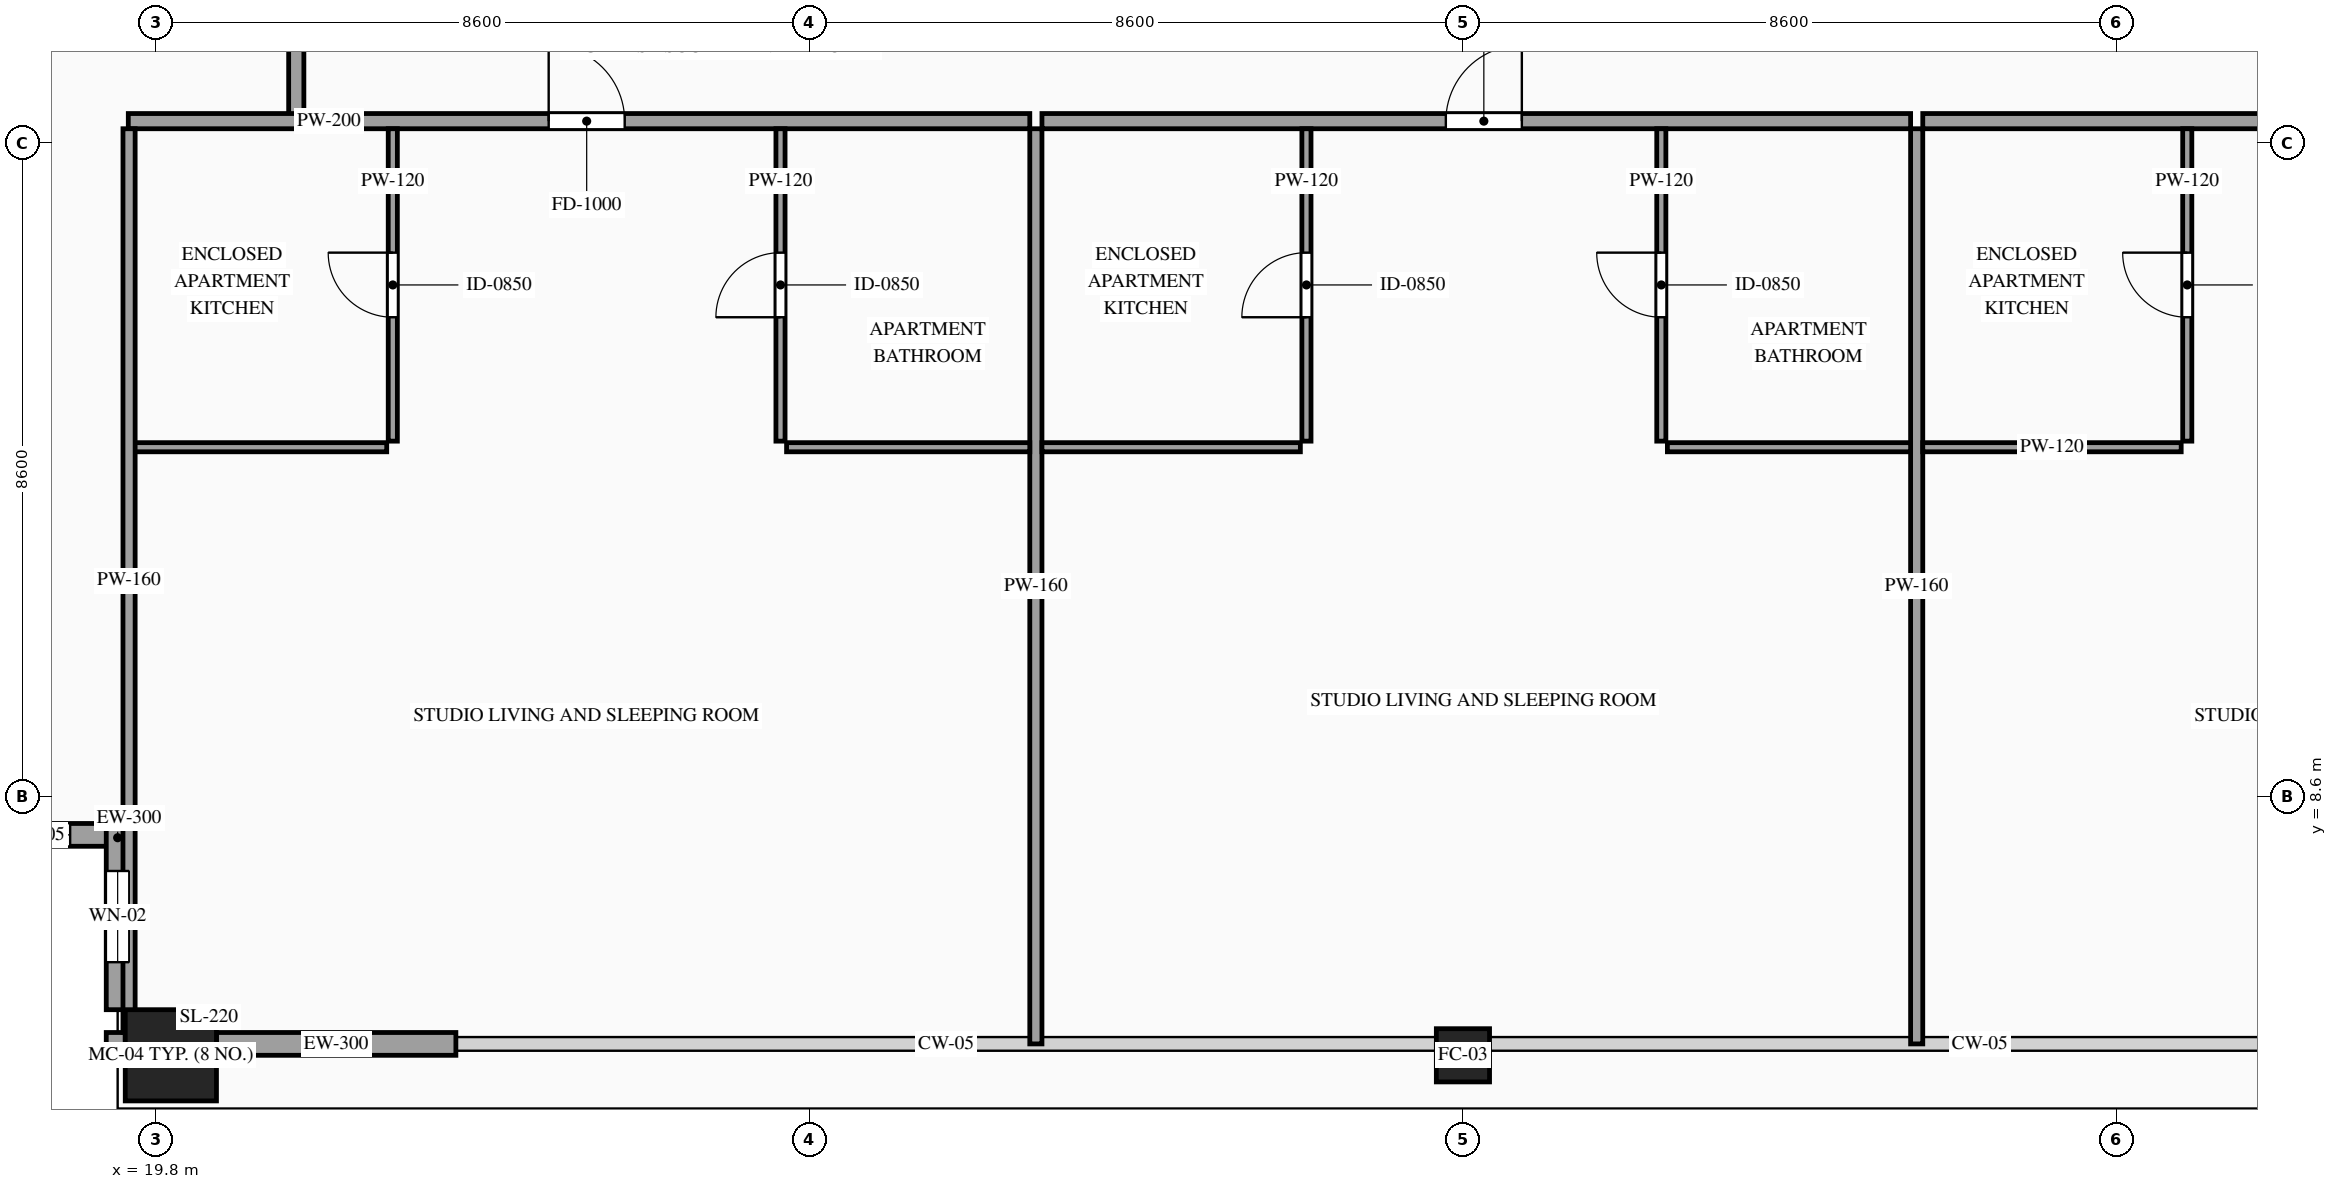
"""IFC4 building model, lengths in metres.
Left out: names, types, materials, properties, quantities, classifications, styles, units other than length and angle.
Written with IfcOpenShell. Run it as: python <this file> out.ifc"""

import sys

from ifc_helpers import new_model, si_unit, direction, frame, frame_2d, origin, origin_2d, place, context, subcontext, project, spatial, rectangle, hollow_rectangle, extrude, source, transform, mapped, element, fill, save


model = new_model("IFC4")
c1 = context("Model", 3, precision=1e-05, world=origin(), true_north=direction((0.0, 1.0)))
c2 = subcontext(c1, "Body", "Model", "MODEL_VIEW")
j1 = project(units=[si_unit("LENGTHUNIT", "METRE"), si_unit("PLANEANGLEUNIT", "RADIAN")], contexts=[c1])
p1 = place(None, origin())
s1 = spatial("IfcSite", under=j1, at=p1, CompositionType="ELEMENT")
p2 = place(p1, origin())
s2 = spatial("IfcBuilding", under=s1, at=p2, CompositionType="ELEMENT")
p3 = place(p2, frame((0.0, 0.0, 268.1)))
s3 = spatial("IfcBuildingStorey", under=s2, at=p3, CompositionType="ELEMENT", Elevation=268.1)
m1 = source(origin(), c2, "Body", "SweptSolid", [
    extrude(hollow_rectangle(XDim=1.2, YDim=1.2, WallThickness=0.055, at=origin_2d()), origin(), (0.0, 0.0, 1.0), 3.5),
])
p4 = place(p3, frame((20.0, 5.2, 0.0), z_axis=(0.0, 0.0, 1.0), x_axis=(1.0, 0.0, 0.0)))
e1 = element("IfcColumn", 1, at=p4, inside=s3, PredefinedType="COLUMN", context=c2, shape_type="MappedRepresentation", body=[
    mapped(m1, transform((0.0, 0.0, 0.0), scale=1.0)),
])
m2 = source(origin(), c2, "Body", "SweptSolid", [
    extrude(hollow_rectangle(XDim=0.7, YDim=0.7, WallThickness=0.032, at=origin_2d()), origin(), (0.0, 0.0, 1.0), 3.5),
])
p5 = place(p3, frame((37.0, 5.2, 0.0), z_axis=(0.0, 0.0, 1.0), x_axis=(1.0, 0.0, 0.0)))
e2 = element("IfcColumn", 2, at=p5, inside=s3, PredefinedType="COLUMN", context=c2, shape_type="MappedRepresentation", body=[
    mapped(m2, transform((0.0, 0.0, 0.0), scale=1.0)),
])
p6 = place(p3, frame((17.0, 8.1, 0.0), z_axis=(0.0, 0.0, 1.0), x_axis=(1.0, 0.0, 0.0)))
e3 = element("IfcWall", 3, at=p6, inside=s3, PredefinedType="SOLIDWALL", context=c2, shape_type="SweptSolid", body=[
    extrude(rectangle(XDim=2.45, YDim=0.3, at=frame_2d((1.225, 0.0))), origin(), (0.0, 0.0, 1.0), 3.28),
])
p7 = place(p6, frame((0.775, 0.0, 0.85)))
e4 = element("IfcOpeningElement", 4, at=p7, cuts=e3, PredefinedType="OPENING", context=c2, shape_type="SweptSolid", body=[
    extrude(rectangle(XDim=0.9, YDim=1.5, at=frame_2d((0.45, 0.75))), frame((0.0, 0.165, 0.0), z_axis=(0.0, -1.0, 0.0), x_axis=(1.0, 0.0, 0.0)), (0.0, 0.0, 1.0), 0.33),
])
p8 = place(p3, frame((19.3, 8.25, 0.0), z_axis=(0.0, 0.0, 1.0), x_axis=(0.0, -1.0, 0.0)))
e5 = element("IfcWall", 5, at=p8, inside=s3, PredefinedType="SOLIDWALL", context=c2, shape_type="SweptSolid", body=[
    extrude(rectangle(XDim=2.45, YDim=0.3, at=frame_2d((1.225, 0.0))), origin(), (0.0, 0.0, 1.0), 3.28),
])
p9 = place(p8, frame((0.625, 0.0, 0.85)))
e6 = element("IfcOpeningElement", 6, at=p9, cuts=e5, PredefinedType="OPENING", context=c2, shape_type="SweptSolid", body=[
    extrude(rectangle(XDim=1.2, YDim=2.1, at=frame_2d((0.6, 1.05))), frame((0.0, 0.165, 0.0), z_axis=(0.0, -1.0, 0.0), x_axis=(1.0, 0.0, 0.0)), (0.0, 0.0, 1.0), 0.33),
])
m3 = source(origin(), c2, "Body", "SweptSolid", [
    extrude(rectangle(XDim=0.25, YDim=0.3, at=frame_2d((0.125, 0.0))), origin(), (0.0, 0.0, 1.0), 3.28),
])
p10 = place(p3, frame((19.15, 5.35, 0.0), z_axis=(0.0, 0.0, 1.0), x_axis=(1.0, 0.0, 0.0)))
e7 = element("IfcWall", 7, at=p10, inside=s3, PredefinedType="SOLIDWALL", context=c2, shape_type="MappedRepresentation", body=[
    mapped(m3, transform((0.0, 0.0, 0.0), scale=1.0)),
])
m4 = source(origin(), c2, "Body", "SweptSolid", [
    extrude(rectangle(XDim=3.15, YDim=0.3, at=frame_2d((1.575, 0.0))), origin(), (0.0, 0.0, 1.0), 2.835),
])
p11 = place(p3, frame((20.6, 5.35, 0.0), z_axis=(0.0, 0.0, 1.0), x_axis=(1.0, 0.0, 0.0)))
e8 = element("IfcWall", 8, at=p11, inside=s3, PredefinedType="SOLIDWALL", context=c2, shape_type="MappedRepresentation", body=[
    mapped(m4, transform((0.0, 0.0, 0.0), scale=1.0)),
])
m5 = source(origin(), c2, "Body", "SweptSolid", [
    extrude(rectangle(XDim=1.7, YDim=0.2, at=frame_2d((0.85, 0.0))), origin(), (0.0, 0.0, 1.0), 3.28),
])
p12 = place(p3, frame((21.65, 17.55, 0.0), z_axis=(0.0, 0.0, 1.0), x_axis=(0.0, 1.0, 0.0)))
e9 = element("IfcWall", 9, at=p12, inside=s3, PredefinedType="PARTITIONING", context=c2, shape_type="MappedRepresentation", body=[
    mapped(m5, transform((0.0, 0.0, 0.0), scale=1.0)),
])
p13 = place(p3, frame((19.44, 17.49, 0.0), z_axis=(0.0, 0.0, 1.0), x_axis=(1.0, 0.0, 0.0)))
e10 = element("IfcWall", 10, at=p13, inside=s3, PredefinedType="PARTITIONING", context=c2, shape_type="SweptSolid", body=[
    extrude(rectangle(XDim=11.861, YDim=0.2, at=frame_2d((5.931, 0.0))), origin(), (0.0, 0.0, 1.0), 3.28),
])
p14 = place(p13, frame((5.531, 0.0, 0.0)))
e11 = element("IfcOpeningElement", 11, at=p14, cuts=e10, PredefinedType="OPENING", context=c2, shape_type="SweptSolid", body=[
    extrude(rectangle(XDim=1.0, YDim=2.2, at=frame_2d((0.5, 1.1))), frame((0.0, 0.115, 0.0), z_axis=(0.0, -1.0, 0.0), x_axis=(1.0, 0.0, 0.0)), (0.0, 0.0, 1.0), 0.23),
])
m6 = source(origin(), c2, "Body", "SweptSolid", [
    extrude(rectangle(XDim=12.04, YDim=0.16, at=frame_2d((6.02, 0.0))), origin(), (0.0, 0.0, 1.0), 3.28),
])
p15 = place(p3, frame((31.381, 5.35, 0.0), z_axis=(0.0, 0.0, 1.0), x_axis=(0.0, 1.0, 0.0)))
e12 = element("IfcWall", 12, at=p15, inside=s3, PredefinedType="PARTITIONING", context=c2, shape_type="MappedRepresentation", body=[
    mapped(m6, transform((0.0, 0.0, 0.0), scale=1.0)),
])
m7 = source(origin(), c2, "Body", "SweptSolid", [
    extrude(rectangle(XDim=3.4, YDim=0.12, at=frame_2d((1.7, 0.0))), origin(), (0.0, 0.0, 1.0), 3.28),
])
p16 = place(p3, frame((19.44, 13.2, 0.0), z_axis=(0.0, 0.0, 1.0), x_axis=(1.0, 0.0, 0.0)))
e13 = element("IfcWall", 13, at=p16, inside=s3, PredefinedType="PARTITIONING", context=c2, shape_type="MappedRepresentation", body=[
    mapped(m7, transform((0.0, 0.0, 0.0), scale=1.0)),
])
p17 = place(p3, frame((22.92, 13.28, 0.0), z_axis=(0.0, 0.0, 1.0), x_axis=(0.0, 1.0, 0.0)))
e14 = element("IfcWall", 14, at=p17, inside=s3, PredefinedType="PARTITIONING", context=c2, shape_type="SweptSolid", body=[
    extrude(rectangle(XDim=4.11, YDim=0.12, at=frame_2d((2.055, 0.0))), origin(), (0.0, 0.0, 1.0), 3.28),
])
p18 = place(p17, frame((1.63, 0.0, 0.0)))
e15 = element("IfcOpeningElement", 15, at=p18, cuts=e14, PredefinedType="OPENING", context=c2, shape_type="SweptSolid", body=[
    extrude(rectangle(XDim=0.85, YDim=2.1, at=frame_2d((0.425, 1.05))), frame((0.0, 0.075, 0.0), z_axis=(0.0, -1.0, 0.0), x_axis=(1.0, 0.0, 0.0)), (0.0, 0.0, 1.0), 0.15),
])
m8 = source(origin(), c2, "Body", "SweptSolid", [
    extrude(rectangle(XDim=3.2, YDim=0.12, at=frame_2d((1.6, 0.0))), origin(), (0.0, 0.0, 1.0), 3.28),
])
p19 = place(p3, frame((28.101, 13.2, 0.0), z_axis=(0.0, 0.0, 1.0), x_axis=(1.0, 0.0, 0.0)))
e16 = element("IfcWall", 16, at=p19, inside=s3, PredefinedType="PARTITIONING", context=c2, shape_type="MappedRepresentation", body=[
    mapped(m8, transform((0.0, 0.0, 0.0), scale=1.0)),
])
p20 = place(p3, frame((28.021, 13.28, 0.0), z_axis=(0.0, 0.0, 1.0), x_axis=(0.0, 1.0, 0.0)))
e17 = element("IfcWall", 17, at=p20, inside=s3, PredefinedType="PARTITIONING", context=c2, shape_type="SweptSolid", body=[
    extrude(rectangle(XDim=4.11, YDim=0.12, at=frame_2d((2.055, 0.0))), origin(), (0.0, 0.0, 1.0), 3.28),
])
p21 = place(p20, frame((1.63, 0.0, 0.0)))
e18 = element("IfcOpeningElement", 18, at=p21, cuts=e17, PredefinedType="OPENING", context=c2, shape_type="SweptSolid", body=[
    extrude(rectangle(XDim=0.85, YDim=2.1, at=frame_2d((0.425, 1.05))), frame((0.0, 0.075, 0.0), z_axis=(0.0, -1.0, 0.0), x_axis=(1.0, 0.0, 0.0)), (0.0, 0.0, 1.0), 0.15),
])
p22 = place(p3, frame((31.461, 17.49, 0.0), z_axis=(0.0, 0.0, 1.0), x_axis=(1.0, 0.0, 0.0)))
e19 = element("IfcWall", 19, at=p22, inside=s3, PredefinedType="PARTITIONING", context=c2, shape_type="SweptSolid", body=[
    extrude(rectangle(XDim=11.429, YDim=0.2, at=frame_2d((5.714, 0.0))), origin(), (0.0, 0.0, 1.0), 3.28),
])
p23 = place(p22, frame((5.314, 0.0, 0.0)))
e20 = element("IfcOpeningElement", 20, at=p23, cuts=e19, PredefinedType="OPENING", context=c2, shape_type="SweptSolid", body=[
    extrude(rectangle(XDim=1.0, YDim=2.2, at=frame_2d((0.5, 1.1))), frame((0.0, 0.115, 0.0), z_axis=(0.0, -1.0, 0.0), x_axis=(1.0, 0.0, 0.0)), (0.0, 0.0, 1.0), 0.23),
])
p24 = place(p3, frame((42.97, 5.35, 0.0), z_axis=(0.0, 0.0, 1.0), x_axis=(0.0, 1.0, 0.0)))
e21 = element("IfcWall", 21, at=p24, inside=s3, PredefinedType="PARTITIONING", context=c2, shape_type="MappedRepresentation", body=[
    mapped(m6, transform((0.0, 0.0, 0.0), scale=1.0)),
])
p25 = place(p3, frame((31.461, 13.2, 0.0), z_axis=(0.0, 0.0, 1.0), x_axis=(1.0, 0.0, 0.0)))
e22 = element("IfcWall", 22, at=p25, inside=s3, PredefinedType="PARTITIONING", context=c2, shape_type="MappedRepresentation", body=[
    mapped(m7, transform((0.0, 0.0, 0.0), scale=1.0)),
])
p26 = place(p3, frame((34.941, 13.28, 0.0), z_axis=(0.0, 0.0, 1.0), x_axis=(0.0, 1.0, 0.0)))
e23 = element("IfcWall", 23, at=p26, inside=s3, PredefinedType="PARTITIONING", context=c2, shape_type="SweptSolid", body=[
    extrude(rectangle(XDim=4.11, YDim=0.12, at=frame_2d((2.055, 0.0))), origin(), (0.0, 0.0, 1.0), 3.28),
])
p27 = place(p26, frame((1.63, 0.0, 0.0)))
e24 = element("IfcOpeningElement", 24, at=p27, cuts=e23, PredefinedType="OPENING", context=c2, shape_type="SweptSolid", body=[
    extrude(rectangle(XDim=0.85, YDim=2.1, at=frame_2d((0.425, 1.05))), frame((0.0, 0.075, 0.0), z_axis=(0.0, -1.0, 0.0), x_axis=(1.0, 0.0, 0.0)), (0.0, 0.0, 1.0), 0.15),
])
p28 = place(p3, frame((39.69, 13.2, 0.0), z_axis=(0.0, 0.0, 1.0), x_axis=(1.0, 0.0, 0.0)))
e25 = element("IfcWall", 25, at=p28, inside=s3, PredefinedType="PARTITIONING", context=c2, shape_type="MappedRepresentation", body=[
    mapped(m8, transform((0.0, 0.0, 0.0), scale=1.0)),
])
p29 = place(p3, frame((39.61, 13.28, 0.0), z_axis=(0.0, 0.0, 1.0), x_axis=(0.0, 1.0, 0.0)))
e26 = element("IfcWall", 26, at=p29, inside=s3, PredefinedType="PARTITIONING", context=c2, shape_type="SweptSolid", body=[
    extrude(rectangle(XDim=4.11, YDim=0.12, at=frame_2d((2.055, 0.0))), origin(), (0.0, 0.0, 1.0), 3.28),
])
p30 = place(p29, frame((1.63, 0.0, 0.0)))
e27 = element("IfcOpeningElement", 27, at=p30, cuts=e26, PredefinedType="OPENING", context=c2, shape_type="SweptSolid", body=[
    extrude(rectangle(XDim=0.85, YDim=2.1, at=frame_2d((0.425, 1.05))), frame((0.0, 0.075, 0.0), z_axis=(0.0, -1.0, 0.0), x_axis=(1.0, 0.0, 0.0)), (0.0, 0.0, 1.0), 0.15),
])
p31 = place(p3, frame((43.05, 17.49, 0.0), z_axis=(0.0, 0.0, 1.0), x_axis=(1.0, 0.0, 0.0)))
e28 = element("IfcWall", 28, at=p31, inside=s3, PredefinedType="PARTITIONING", context=c2, shape_type="SweptSolid", body=[
    extrude(rectangle(XDim=11.51, YDim=0.2, at=frame_2d((5.755, 0.0))), origin(), (0.0, 0.0, 1.0), 3.28),
])
p32 = place(p31, frame((5.355, 0.0, 0.0)))
e29 = element("IfcOpeningElement", 29, at=p32, cuts=e28, PredefinedType="OPENING", context=c2, shape_type="SweptSolid", body=[
    extrude(rectangle(XDim=1.0, YDim=2.2, at=frame_2d((0.5, 1.1))), frame((0.0, 0.115, 0.0), z_axis=(0.0, -1.0, 0.0), x_axis=(1.0, 0.0, 0.0)), (0.0, 0.0, 1.0), 0.23),
])
m9 = source(origin(), c2, "Body", "SweptSolid", [
    extrude(rectangle(XDim=11.89, YDim=0.16, at=frame_2d((5.945, 0.0))), origin(), (0.0, 0.0, 1.0), 3.28),
])
p33 = place(p3, frame((19.45, 5.5, 0.0), z_axis=(0.0, 0.0, 1.0), x_axis=(0.0, 1.0, 0.0)))
e30 = element("IfcWall", 30, at=p33, inside=s3, PredefinedType="PARTITIONING", context=c2, shape_type="MappedRepresentation", body=[
    mapped(m9, transform((0.0, 0.0, 0.0), scale=1.0)),
])
m10 = source(origin(), c2, "Body", "SweptSolid", [
    extrude(rectangle(XDim=3.4, YDim=0.12, at=frame_2d((1.7, 0.0))), origin(), (0.0, 0.0, 1.0), 3.28),
])
p34 = place(p3, frame((43.05, 13.2, 0.0), z_axis=(0.0, 0.0, 1.0), x_axis=(1.0, 0.0, 0.0)))
e31 = element("IfcWall", 31, at=p34, inside=s3, PredefinedType="PARTITIONING", context=c2, shape_type="MappedRepresentation", body=[
    mapped(m10, transform((0.0, 0.0, 0.0), scale=1.0)),
])
p35 = place(p3, frame((46.53, 13.28, 0.0), z_axis=(0.0, 0.0, 1.0), x_axis=(0.0, 1.0, 0.0)))
e32 = element("IfcWall", 32, at=p35, inside=s3, PredefinedType="PARTITIONING", context=c2, shape_type="SweptSolid", body=[
    extrude(rectangle(XDim=4.11, YDim=0.12, at=frame_2d((2.055, 0.0))), origin(), (0.0, 0.0, 1.0), 3.28),
])
p36 = place(p35, frame((1.63, 0.0, 0.0)))
e33 = element("IfcOpeningElement", 33, at=p36, cuts=e32, PredefinedType="OPENING", context=c2, shape_type="SweptSolid", body=[
    extrude(rectangle(XDim=0.85, YDim=2.1, at=frame_2d((0.425, 1.05))), frame((0.0, 0.075, 0.0), z_axis=(0.0, -1.0, 0.0), x_axis=(1.0, 0.0, 0.0)), (0.0, 0.0, 1.0), 0.15),
])
m11 = source(origin(), c2, "Body", "SweptSolid", [
    extrude(rectangle(XDim=0.9, YDim=1.5, at=frame_2d((0.45, 0.75))), frame((0.0, 0.03, 0.0), z_axis=(0.0, -1.0, 0.0), x_axis=(1.0, 0.0, 0.0)), (0.0, 0.0, 1.0), 0.06),
])
p37 = place(p7, origin())
e34 = element("IfcWindow", 34, at=p37, inside=s3, PartitioningType="SINGLE_PANEL", PredefinedType="WINDOW", context=c2, shape_type="MappedRepresentation", body=[
    mapped(m11, transform((0.0, 0.0, 0.0), scale=1.0)),
])
fill(e4, e34)
m12 = source(origin(), c2, "Body", "SweptSolid", [
    extrude(rectangle(XDim=1.2, YDim=2.1, at=frame_2d((0.6, 1.05))), frame((0.0, 0.03, 0.0), z_axis=(0.0, -1.0, 0.0), x_axis=(1.0, 0.0, 0.0)), (0.0, 0.0, 1.0), 0.06),
])
p38 = place(p9, origin())
e35 = element("IfcWindow", 35, at=p38, inside=s3, PartitioningType="SINGLE_PANEL", PredefinedType="WINDOW", context=c2, shape_type="MappedRepresentation", body=[
    mapped(m12, transform((0.0, 0.0, 0.0), scale=1.0)),
])
fill(e6, e35)
m13 = source(origin(), c2, "Body", "SweptSolid", [
    extrude(rectangle(XDim=1.0, YDim=2.2, at=frame_2d((0.5, 1.1))), frame((0.0, 0.025, 0.0), z_axis=(0.0, -1.0, 0.0), x_axis=(1.0, 0.0, 0.0)), (0.0, 0.0, 1.0), 0.05),
])
p39 = place(p14, origin())
e36 = element("IfcDoor", 36, at=p39, inside=s3, OperationType="SINGLE_SWING_LEFT", PredefinedType="DOOR", context=c2, shape_type="MappedRepresentation", body=[
    mapped(m13, transform((0.0, 0.0, 0.0), scale=1.0)),
])
fill(e11, e36)
m14 = source(origin(), c2, "Body", "SweptSolid", [
    extrude(rectangle(XDim=0.85, YDim=2.1, at=frame_2d((0.425, 1.05))), frame((0.0, 0.025, 0.0), z_axis=(0.0, -1.0, 0.0), x_axis=(1.0, 0.0, 0.0)), (0.0, 0.0, 1.0), 0.05),
])
p40 = place(p18, origin())
e37 = element("IfcDoor", 37, at=p40, inside=s3, OperationType="SINGLE_SWING_RIGHT", PredefinedType="DOOR", context=c2, shape_type="MappedRepresentation", body=[
    mapped(m14, transform((0.0, 0.0, 0.0), scale=1.0)),
])
fill(e15, e37)
p41 = place(p21, origin())
e38 = element("IfcDoor", 38, at=p41, inside=s3, OperationType="SINGLE_SWING_LEFT", PredefinedType="DOOR", context=c2, shape_type="MappedRepresentation", body=[
    mapped(m14, transform((0.0, 0.0, 0.0), scale=1.0)),
])
fill(e18, e38)
p42 = place(p23, origin())
e39 = element("IfcDoor", 39, at=p42, inside=s3, OperationType="SINGLE_SWING_RIGHT", PredefinedType="DOOR", context=c2, shape_type="MappedRepresentation", body=[
    mapped(m13, transform((0.0, 0.0, 0.0), scale=1.0)),
])
fill(e20, e39)
p43 = place(p27, origin())
e40 = element("IfcDoor", 40, at=p43, inside=s3, OperationType="SINGLE_SWING_LEFT", PredefinedType="DOOR", context=c2, shape_type="MappedRepresentation", body=[
    mapped(m14, transform((0.0, 0.0, 0.0), scale=1.0)),
])
fill(e24, e40)
p44 = place(p30, origin())
e41 = element("IfcDoor", 41, at=p44, inside=s3, OperationType="SINGLE_SWING_RIGHT", PredefinedType="DOOR", context=c2, shape_type="MappedRepresentation", body=[
    mapped(m14, transform((0.0, 0.0, 0.0), scale=1.0)),
])
fill(e27, e41)
p45 = place(p36, origin())
e42 = element("IfcDoor", 42, at=p45, inside=s3, OperationType="SINGLE_SWING_RIGHT", PredefinedType="DOOR", context=c2, shape_type="MappedRepresentation", body=[
    mapped(m14, transform((0.0, 0.0, 0.0), scale=1.0)),
])
fill(e33, e42)
save(model, sys.argv[1])
